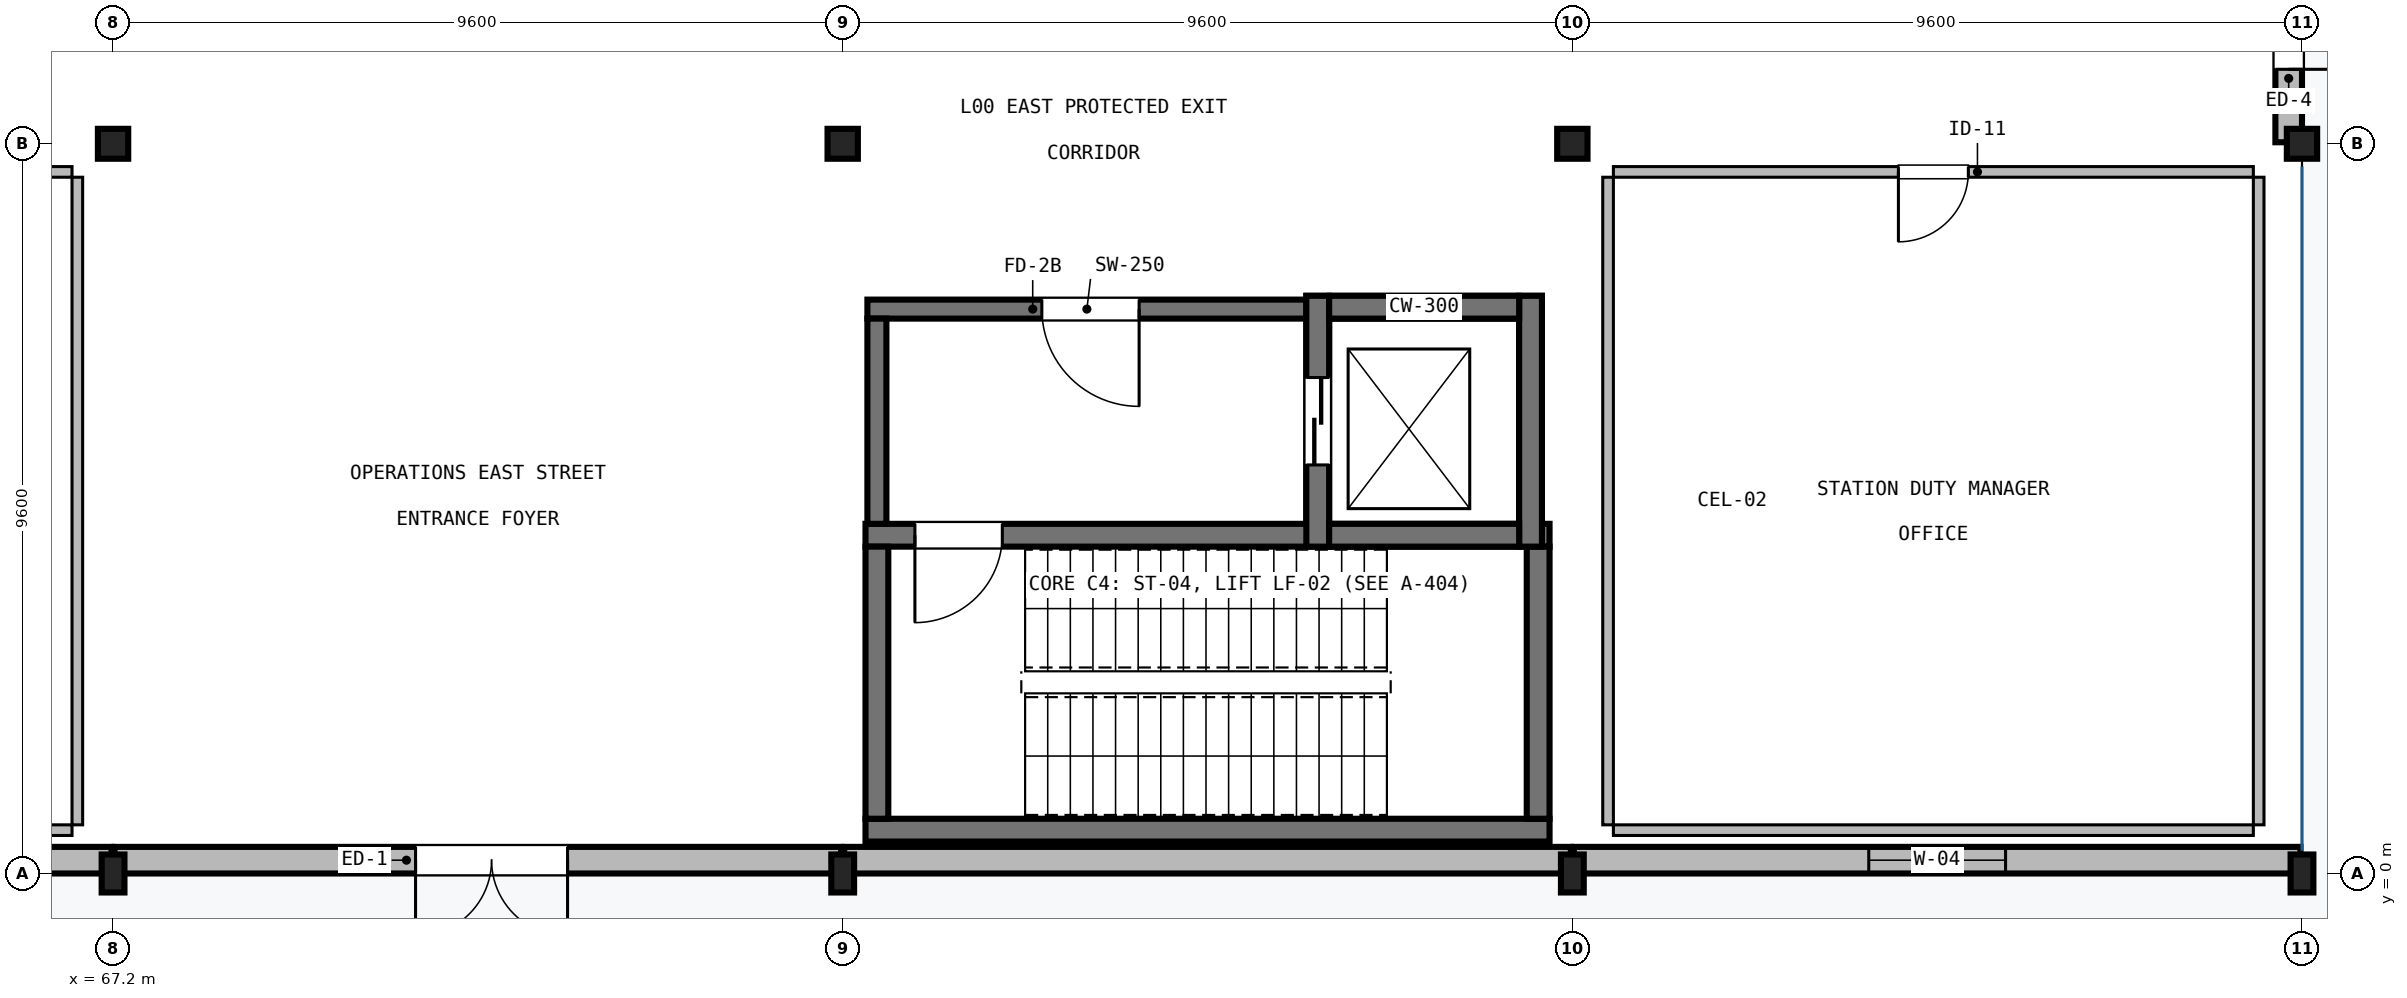
"""IFC4 building model, lengths in metres.
Left out: names, types, materials, properties, quantities, classifications, styles, units other than length and angle.
Written with IfcOpenShell. Run it as: python <this file> out.ifc"""

import sys

from ifc_helpers import new_model, si_unit, direction, frame, frame_2d, origin, origin_2d, place, context, subcontext, project, spatial, rectangle, i_section, extrude, element, fill, save


model = new_model("IFC4")
c1 = context("Model", 3, precision=1e-05, world=origin(), true_north=direction((0.0, 1.0)))
c2 = subcontext(c1, "Body", "Model", "MODEL_VIEW")
j1 = project(units=[si_unit("LENGTHUNIT", "METRE"), si_unit("PLANEANGLEUNIT", "RADIAN")], contexts=[c1])
p1 = place(None, origin())
s1 = spatial("IfcSite", under=j1, at=p1, CompositionType="ELEMENT")
p2 = place(p1, origin())
s2 = spatial("IfcBuilding", under=s1, at=p2, CompositionType="ELEMENT")
p3 = place(p2, origin())
s3 = spatial("IfcBuildingStorey", under=s2, at=p3, CompositionType="ELEMENT", Elevation=0.0)
p4 = place(p3, frame((67.2, 0.0, -0.36), z_axis=(0.0, 0.0, 1.0), x_axis=(1.0, 0.0, 0.0)))
e1 = element("IfcColumn", 1, at=p4, inside=s3, PredefinedType="COLUMN", context=c2, shape_type="SweptSolid", body=[
    extrude(i_section(OverallWidth=0.3, OverallDepth=0.5, WebThickness=0.014, FlangeThickness=0.028, FilletRadius=0.027, at=origin_2d()), origin(), (0.0, 0.0, 1.0), 6.11),
])
p5 = place(p3, frame((67.2, 9.6, -0.36), z_axis=(0.0, 0.0, 1.0), x_axis=(1.0, 0.0, 0.0)))
e2 = element("IfcColumn", 2, at=p5, inside=s3, PredefinedType="COLUMN", context=c2, shape_type="SweptSolid", body=[
    extrude(i_section(OverallWidth=0.399, OverallDepth=0.394, WebThickness=0.023, FlangeThickness=0.037, FilletRadius=0.015, at=origin_2d()), origin(), (0.0, 0.0, 1.0), 6.11),
])
p6 = place(p3, frame((76.8, 0.0, -0.36), z_axis=(0.0, 0.0, 1.0), x_axis=(1.0, 0.0, 0.0)))
e3 = element("IfcColumn", 3, at=p6, inside=s3, PredefinedType="COLUMN", context=c2, shape_type="SweptSolid", body=[
    extrude(i_section(OverallWidth=0.3, OverallDepth=0.5, WebThickness=0.014, FlangeThickness=0.028, FilletRadius=0.027, at=origin_2d()), origin(), (0.0, 0.0, 1.0), 6.11),
])
p7 = place(p3, frame((76.8, 9.6, -0.36), z_axis=(0.0, 0.0, 1.0), x_axis=(1.0, 0.0, 0.0)))
e4 = element("IfcColumn", 4, at=p7, inside=s3, PredefinedType="COLUMN", context=c2, shape_type="SweptSolid", body=[
    extrude(i_section(OverallWidth=0.399, OverallDepth=0.394, WebThickness=0.023, FlangeThickness=0.037, FilletRadius=0.015, at=origin_2d()), origin(), (0.0, 0.0, 1.0), 6.11),
])
p8 = place(p3, frame((86.4, 0.0, -0.36), z_axis=(0.0, 0.0, 1.0), x_axis=(1.0, 0.0, 0.0)))
e5 = element("IfcColumn", 5, at=p8, inside=s3, PredefinedType="COLUMN", context=c2, shape_type="SweptSolid", body=[
    extrude(i_section(OverallWidth=0.3, OverallDepth=0.5, WebThickness=0.014, FlangeThickness=0.028, FilletRadius=0.027, at=origin_2d()), origin(), (0.0, 0.0, 1.0), 6.11),
])
p9 = place(p3, frame((86.4, 9.6, -0.36), z_axis=(0.0, 0.0, 1.0), x_axis=(1.0, 0.0, 0.0)))
e6 = element("IfcColumn", 6, at=p9, inside=s3, PredefinedType="COLUMN", context=c2, shape_type="SweptSolid", body=[
    extrude(i_section(OverallWidth=0.399, OverallDepth=0.394, WebThickness=0.023, FlangeThickness=0.037, FilletRadius=0.015, at=origin_2d()), origin(), (0.0, 0.0, 1.0), 6.11),
])
p10 = place(p3, frame((96.0, 0.0, -0.36), z_axis=(0.0, 0.0, 1.0), x_axis=(1.0, 0.0, 0.0)))
e7 = element("IfcColumn", 7, at=p10, inside=s3, PredefinedType="COLUMN", context=c2, shape_type="SweptSolid", body=[
    extrude(i_section(OverallWidth=0.3, OverallDepth=0.5, WebThickness=0.014, FlangeThickness=0.028, FilletRadius=0.027, at=origin_2d()), origin(), (0.0, 0.0, 1.0), 6.11),
])
p11 = place(p3, frame((96.0, 9.6, -0.36), z_axis=(0.0, 0.0, 1.0), x_axis=(1.0, 0.0, 0.0)))
e8 = element("IfcColumn", 8, at=p11, inside=s3, PredefinedType="COLUMN", context=c2, shape_type="SweptSolid", body=[
    extrude(i_section(OverallWidth=0.399, OverallDepth=0.394, WebThickness=0.023, FlangeThickness=0.037, FilletRadius=0.015, at=origin_2d()), origin(), (0.0, 0.0, 1.0), 6.11),
])
p12 = place(p3, frame((77.1, 0.57, 0.0), z_axis=(0.0, 0.0, 1.0), x_axis=(1.0, 0.0, 0.0)))
e9 = element("IfcWall", 9, at=p12, inside=s3, PredefinedType="SHEAR", context=c2, shape_type="SweptSolid", body=[
    extrude(rectangle(XDim=9.0, YDim=0.3, at=frame_2d((4.5, 0.0))), origin(), (0.0, 0.0, 1.0), 5.75),
])
p13 = place(p3, frame((86.1, 4.45, 0.0), z_axis=(0.0, 0.0, 1.0), x_axis=(-1.0, 0.0, 0.0)))
e10 = element("IfcWall", 10, at=p13, inside=s3, PredefinedType="SHEAR", context=c2, shape_type="SweptSolid", body=[
    extrude(rectangle(XDim=9.0, YDim=0.3, at=frame_2d((4.5, 0.0))), origin(), (0.0, 0.0, 1.0), 5.75),
])
p14 = place(p13, frame((7.2, 0.0, 0.0)))
e11 = element("IfcOpeningElement", 11, at=p14, cuts=e10, PredefinedType="OPENING", context=c2, shape_type="SweptSolid", body=[
    extrude(rectangle(XDim=1.15, YDim=2.15, at=frame_2d((0.575, 1.075))), frame((0.0, 0.16, 0.0), z_axis=(0.0, -1.0, 0.0), x_axis=(1.0, 0.0, 0.0)), (0.0, 0.0, 1.0), 0.32),
])
for number, where, z_axis, x_axis in (
    (12, (77.25, 0.72, 0.0), (0.0, 0.0, 1.0), (0.0, 1.0, 0.0)),
    (13, (85.95, 4.3, 0.0), (0.0, 0.0, 1.0), (0.0, -1.0, 0.0)),
):
    element("IfcWall", number, at=place(p3, frame(where, z_axis=z_axis, x_axis=x_axis)), inside=s3, PredefinedType="SHEAR", context=c2, shape_type="SweptSolid", body=[
        extrude(rectangle(XDim=3.58, YDim=0.3, at=frame_2d((1.79, 0.0))), origin(), (0.0, 0.0, 1.0), 5.75),
    ])
p15 = place(p3, frame((83.05, 7.3, 0.0), z_axis=(0.0, 0.0, 1.0), x_axis=(0.0, -1.0, 0.0)))
e14 = element("IfcWall", 14, at=p15, inside=s3, PredefinedType="SHEAR", context=c2, shape_type="SweptSolid", body=[
    extrude(rectangle(XDim=2.7, YDim=0.3, at=frame_2d((1.35, 0.0))), origin(), (0.0, 0.0, 1.0), 5.75),
])
p16 = place(p15, frame((0.775, 0.0, 0.0)))
e15 = element("IfcOpeningElement", 15, at=p16, cuts=e14, PredefinedType="OPENING", context=c2, shape_type="SweptSolid", body=[
    extrude(rectangle(XDim=1.15, YDim=2.1, at=frame_2d((0.575, 1.05))), frame((0.0, 0.16, 0.0), z_axis=(0.0, -1.0, 0.0), x_axis=(1.0, 0.0, 0.0)), (0.0, 0.0, 1.0), 0.32),
])
p17 = place(p3, frame((85.85, 4.6, 0.0), z_axis=(0.0, 0.0, 1.0), x_axis=(0.0, 1.0, 0.0)))
e16 = element("IfcWall", 16, at=p17, inside=s3, PredefinedType="SHEAR", context=c2, shape_type="SweptSolid", body=[
    extrude(rectangle(XDim=2.7, YDim=0.3, at=frame_2d((1.35, 0.0))), origin(), (0.0, 0.0, 1.0), 5.75),
])
p18 = place(p3, frame((82.9, 7.45, 0.0), z_axis=(0.0, 0.0, 1.0), x_axis=(1.0, 0.0, 0.0)))
e17 = element("IfcWall", 17, at=p18, inside=s3, PredefinedType="SHEAR", context=c2, shape_type="SweptSolid", body=[
    extrude(rectangle(XDim=3.1, YDim=0.3, at=frame_2d((1.55, 0.0))), origin(), (0.0, 0.0, 1.0), 5.75),
])
p19 = place(p3, frame((82.9, 7.425, 0.0), z_axis=(0.0, 0.0, 1.0), x_axis=(-1.0, 0.0, 0.0)))
e18 = element("IfcWall", 18, at=p19, inside=s3, PredefinedType="SHEAR", context=c2, shape_type="SweptSolid", body=[
    extrude(rectangle(XDim=5.775, YDim=0.25, at=frame_2d((2.887, 0.0))), origin(), (0.0, 0.0, 1.0), 5.75),
])
p20 = place(p19, frame((2.2, 0.0, 0.0)))
e19 = element("IfcOpeningElement", 19, at=p20, cuts=e18, PredefinedType="OPENING", context=c2, shape_type="SweptSolid", body=[
    extrude(rectangle(XDim=1.28, YDim=2.2, at=frame_2d((0.64, 1.1))), frame((0.0, 0.135, 0.0), z_axis=(0.0, -1.0, 0.0), x_axis=(1.0, 0.0, 0.0)), (0.0, 0.0, 1.0), 0.27),
])
p21 = place(p3, frame((77.25, 4.6, 0.0), z_axis=(0.0, 0.0, 1.0), x_axis=(0.0, 1.0, 0.0)))
e20 = element("IfcWall", 20, at=p21, inside=s3, PredefinedType="SHEAR", context=c2, shape_type="SweptSolid", body=[
    extrude(rectangle(XDim=2.7, YDim=0.25, at=frame_2d((1.35, 0.0))), origin(), (0.0, 0.0, 1.0), 5.75),
])
for number, where, z_axis, x_axis in (
    (21, (83.05, 4.3, -1.2), (0.0, 0.0, 1.0), (0.0, 1.0, 0.0)),
    (22, (85.85, 4.3, -1.2), (0.0, 0.0, 1.0), (0.0, 1.0, 0.0)),
):
    element("IfcWall", number, at=place(p3, frame(where, z_axis=z_axis, x_axis=x_axis)), inside=s3, PredefinedType="SHEAR", context=c2, shape_type="SweptSolid", body=[
        extrude(rectangle(XDim=3.3, YDim=0.3, at=frame_2d((1.65, 0.0))), origin(), (0.0, 0.0, 1.0), 0.82),
    ])
for number, where, z_axis, x_axis in (
    (23, (83.2, 4.45, -1.2), (0.0, 0.0, 1.0), (1.0, 0.0, 0.0)),
    (24, (83.2, 7.45, -1.2), (0.0, 0.0, 1.0), (1.0, 0.0, 0.0)),
):
    element("IfcWall", number, at=place(p3, frame(where, z_axis=z_axis, x_axis=x_axis)), inside=s3, PredefinedType="SHEAR", context=c2, shape_type="SweptSolid", body=[
        extrude(rectangle(XDim=2.5, YDim=0.3, at=frame_2d((1.25, 0.0))), origin(), (0.0, 0.0, 1.0), 0.82),
    ])
p22 = place(p3, frame((67.18, 0.175, 0.0), z_axis=(0.0, 0.0, 1.0), x_axis=(-1.0, 0.0, 0.0)))
e25 = element("IfcWall", 25, at=p22, inside=s3, PredefinedType="SOLIDWALL", context=c2, shape_type="SweptSolid", body=[
    extrude(rectangle(XDim=9.56, YDim=0.35, at=frame_2d((4.78, 0.0))), origin(), (0.0, 0.0, 1.0), 5.4),
])
p23 = place(p22, frame((3.505, 0.0, 0.9)))
e26 = element("IfcOpeningElement", 26, at=p23, cuts=e25, PredefinedType="OPENING", context=c2, shape_type="SweptSolid", body=[
    extrude(rectangle(XDim=2.55, YDim=1.8, at=frame_2d((1.275, 0.9))), frame((0.0, 0.185, 0.0), z_axis=(0.0, -1.0, 0.0), x_axis=(1.0, 0.0, 0.0)), (0.0, 0.0, 1.0), 0.37),
])
p24 = place(p3, frame((76.78, 0.175, 0.0), z_axis=(0.0, 0.0, 1.0), x_axis=(-1.0, 0.0, 0.0)))
e27 = element("IfcWall", 27, at=p24, inside=s3, PredefinedType="SOLIDWALL", context=c2, shape_type="SweptSolid", body=[
    extrude(rectangle(XDim=9.56, YDim=0.35, at=frame_2d((4.78, 0.0))), origin(), (0.0, 0.0, 1.0), 5.4),
])
p25 = place(p24, frame((3.6, 0.0, 0.0)))
e28 = element("IfcOpeningElement", 28, at=p25, cuts=e27, PredefinedType="OPENING", context=c2, shape_type="SweptSolid", body=[
    extrude(rectangle(XDim=2.0, YDim=2.4, at=frame_2d((1.0, 1.2))), frame((0.0, 0.185, 0.0), z_axis=(0.0, -1.0, 0.0), x_axis=(1.0, 0.0, 0.0)), (0.0, 0.0, 1.0), 0.37),
])
p26 = place(p3, frame((86.38, 0.175, 0.0), z_axis=(0.0, 0.0, 1.0), x_axis=(-1.0, 0.0, 0.0)))
e29 = element("IfcWall", 29, at=p26, inside=s3, PredefinedType="SOLIDWALL", context=c2, shape_type="SweptSolid", body=[
    extrude(rectangle(XDim=9.56, YDim=0.35, at=frame_2d((4.78, 0.0))), origin(), (0.0, 0.0, 1.0), 5.4),
])
p27 = place(p3, frame((95.98, 0.175, 0.0), z_axis=(0.0, 0.0, 1.0), x_axis=(-1.0, 0.0, 0.0)))
e30 = element("IfcWall", 30, at=p27, inside=s3, PredefinedType="SOLIDWALL", context=c2, shape_type="SweptSolid", body=[
    extrude(rectangle(XDim=9.56, YDim=0.35, at=frame_2d((4.78, 0.0))), origin(), (0.0, 0.0, 1.0), 5.4),
])
p28 = place(p27, frame((3.88, 0.0, 0.9)))
e31 = element("IfcOpeningElement", 31, at=p28, cuts=e30, PredefinedType="OPENING", context=c2, shape_type="SweptSolid", body=[
    extrude(rectangle(XDim=1.8, YDim=1.8, at=frame_2d((0.9, 0.9))), frame((0.0, 0.185, 0.0), z_axis=(0.0, -1.0, 0.0), x_axis=(1.0, 0.0, 0.0)), (0.0, 0.0, 1.0), 0.37),
])
p29 = place(p3, frame((95.825, 19.18, 0.0), z_axis=(0.0, 0.0, 1.0), x_axis=(0.0, -1.0, 0.0)))
e32 = element("IfcWall", 32, at=p29, inside=s3, PredefinedType="SOLIDWALL", context=c2, shape_type="SweptSolid", body=[
    extrude(rectangle(XDim=9.56, YDim=0.35, at=frame_2d((4.78, 0.0))), origin(), (0.0, 0.0, 1.0), 5.217),
])
p30 = place(p29, frame((7.0, 0.0, 0.0)))
e33 = element("IfcOpeningElement", 33, at=p30, cuts=e32, PredefinedType="OPENING", context=c2, shape_type="SweptSolid", body=[
    extrude(rectangle(XDim=1.6, YDim=2.2, at=frame_2d((0.8, 1.1))), frame((0.0, 0.185, 0.0), z_axis=(0.0, -1.0, 0.0), x_axis=(1.0, 0.0, 0.0)), (0.0, 0.0, 1.0), 0.37),
])
p31 = place(p3, frame((66.66, 0.57, 0.0), z_axis=(0.0, 0.0, 1.0), x_axis=(-1.0, 0.0, 0.0)))
e34 = element("IfcWall", 34, at=p31, inside=s3, PredefinedType="PARTITIONING", context=c2, shape_type="SweptSolid", body=[
    extrude(rectangle(XDim=18.12, YDim=0.14, at=frame_2d((9.06, 0.0))), origin(), (0.0, 0.0, 1.0), 5.207),
])
p32 = place(p3, frame((48.54, 9.23, 0.0), z_axis=(0.0, 0.0, 1.0), x_axis=(1.0, 0.0, 0.0)))
e35 = element("IfcWall", 35, at=p32, inside=s3, PredefinedType="PARTITIONING", context=c2, shape_type="SweptSolid", body=[
    extrude(rectangle(XDim=18.12, YDim=0.14, at=frame_2d((9.06, 0.0))), origin(), (0.0, 0.0, 1.0), 5.207),
])
p33 = place(p32, frame((3.6, 0.0, 0.0)))
e36 = element("IfcOpeningElement", 36, at=p33, cuts=e35, PredefinedType="OPENING", context=c2, shape_type="SweptSolid", body=[
    extrude(rectangle(XDim=1.06, YDim=2.2, at=frame_2d((0.53, 1.1))), frame((0.0, 0.08, 0.0), z_axis=(0.0, -1.0, 0.0), x_axis=(1.0, 0.0, 0.0)), (0.0, 0.0, 1.0), 0.16),
])
p34 = place(p3, frame((66.73, 9.16, 0.0), z_axis=(0.0, 0.0, 1.0), x_axis=(0.0, -1.0, 0.0)))
e37 = element("IfcWall", 37, at=p34, inside=s3, PredefinedType="PARTITIONING", context=c2, shape_type="SweptSolid", body=[
    extrude(rectangle(XDim=8.52, YDim=0.14, at=frame_2d((4.26, 0.0))), origin(), (0.0, 0.0, 1.0), 5.39),
])
p35 = place(p3, frame((95.36, 0.57, 0.0), z_axis=(0.0, 0.0, 1.0), x_axis=(-1.0, 0.0, 0.0)))
e38 = element("IfcWall", 38, at=p35, inside=s3, PredefinedType="PARTITIONING", context=c2, shape_type="SweptSolid", body=[
    extrude(rectangle(XDim=8.42, YDim=0.14, at=frame_2d((4.21, 0.0))), origin(), (0.0, 0.0, 1.0), 5.39),
])
p36 = place(p3, frame((86.94, 9.23, 0.0), z_axis=(0.0, 0.0, 1.0), x_axis=(1.0, 0.0, 0.0)))
e39 = element("IfcWall", 39, at=p36, inside=s3, PredefinedType="PARTITIONING", context=c2, shape_type="SweptSolid", body=[
    extrude(rectangle(XDim=8.42, YDim=0.14, at=frame_2d((4.21, 0.0))), origin(), (0.0, 0.0, 1.0), 5.39),
])
p37 = place(p36, frame((3.75, 0.0, 0.0)))
e40 = element("IfcOpeningElement", 40, at=p37, cuts=e39, PredefinedType="OPENING", context=c2, shape_type="SweptSolid", body=[
    extrude(rectangle(XDim=0.92, YDim=2.15, at=frame_2d((0.46, 1.075))), frame((0.0, 0.08, 0.0), z_axis=(0.0, -1.0, 0.0), x_axis=(1.0, 0.0, 0.0)), (0.0, 0.0, 1.0), 0.16),
])
for number, where, z_axis, x_axis in (
    (41, (86.87, 0.64, 0.0), (0.0, 0.0, 1.0), (0.0, 1.0, 0.0)),
    (42, (95.43, 9.16, 0.0), (0.0, 0.0, 1.0), (0.0, -1.0, 0.0)),
):
    element("IfcWall", number, at=place(p3, frame(where, z_axis=z_axis, x_axis=x_axis)), inside=s3, PredefinedType="PARTITIONING", context=c2, shape_type="SweptSolid", body=[
        extrude(rectangle(XDim=8.52, YDim=0.14, at=frame_2d((4.26, 0.0))), origin(), (0.0, 0.0, 1.0), 5.39),
    ])
p38 = place(p14, origin())
e43 = element("IfcDoor", 43, at=p38, inside=s3, OperationType="SINGLE_SWING_RIGHT", PredefinedType="DOOR", context=c2, shape_type="SweptSolid", body=[
    extrude(rectangle(XDim=1.15, YDim=2.15, at=frame_2d((0.575, 1.075))), frame((0.0, 0.025, 0.0), z_axis=(0.0, -1.0, 0.0), x_axis=(1.0, 0.0, 0.0)), (0.0, 0.0, 1.0), 0.05),
])
fill(e11, e43)
p39 = place(p16, frame((1.15, 0.0, 0.0), z_axis=(0.0, 0.0, 1.0), x_axis=(-1.0, 0.0, 0.0)))
e44 = element("IfcDoor", 44, at=p39, inside=s3, OperationType="DOUBLE_DOOR_SLIDING", PredefinedType="DOOR", context=c2, shape_type="SweptSolid", body=[
    extrude(rectangle(XDim=1.15, YDim=2.1, at=frame_2d((0.575, 1.05))), frame((0.0, 0.025, 0.0), z_axis=(0.0, -1.0, 0.0), x_axis=(1.0, 0.0, 0.0)), (0.0, 0.0, 1.0), 0.05),
])
fill(e15, e44)
p40 = place(p20, origin())
e45 = element("IfcDoor", 45, at=p40, inside=s3, OperationType="SINGLE_SWING_LEFT", PredefinedType="DOOR", context=c2, shape_type="SweptSolid", body=[
    extrude(rectangle(XDim=1.28, YDim=2.2, at=frame_2d((0.64, 1.1))), frame((0.0, 0.025, 0.0), z_axis=(0.0, -1.0, 0.0), x_axis=(1.0, 0.0, 0.0)), (0.0, 0.0, 1.0), 0.05),
])
fill(e19, e45)
p41 = place(p25, origin())
e46 = element("IfcDoor", 46, at=p41, inside=s3, OperationType="DOUBLE_DOOR_SINGLE_SWING", PredefinedType="DOOR", context=c2, shape_type="SweptSolid", body=[
    extrude(rectangle(XDim=2.0, YDim=2.4, at=frame_2d((1.0, 1.2))), frame((0.0, 0.025, 0.0), z_axis=(0.0, -1.0, 0.0), x_axis=(1.0, 0.0, 0.0)), (0.0, 0.0, 1.0), 0.05),
])
fill(e28, e46)
p42 = place(p28, origin())
e47 = element("IfcWindow", 47, at=p42, inside=s3, PartitioningType="SINGLE_PANEL", PredefinedType="WINDOW", context=c2, shape_type="SweptSolid", body=[
    extrude(rectangle(XDim=1.8, YDim=1.8, at=frame_2d((0.9, 0.9))), frame((0.0, 0.03, 0.0), z_axis=(0.0, -1.0, 0.0), x_axis=(1.0, 0.0, 0.0)), (0.0, 0.0, 1.0), 0.06),
])
fill(e31, e47)
p43 = place(p30, origin())
e48 = element("IfcDoor", 48, at=p43, inside=s3, OperationType="DOUBLE_DOOR_SINGLE_SWING", PredefinedType="DOOR", context=c2, shape_type="SweptSolid", body=[
    extrude(rectangle(XDim=1.6, YDim=2.2, at=frame_2d((0.8, 1.1))), frame((0.0, 0.025, 0.0), z_axis=(0.0, -1.0, 0.0), x_axis=(1.0, 0.0, 0.0)), (0.0, 0.0, 1.0), 0.05),
])
fill(e33, e48)
p44 = place(p37, frame((0.92, 0.0, 0.0), z_axis=(0.0, 0.0, 1.0), x_axis=(-1.0, 0.0, 0.0)))
e49 = element("IfcDoor", 49, at=p44, inside=s3, OperationType="SINGLE_SWING_LEFT", PredefinedType="DOOR", context=c2, shape_type="SweptSolid", body=[
    extrude(rectangle(XDim=0.92, YDim=2.15, at=frame_2d((0.46, 1.075))), frame((0.0, 0.025, 0.0), z_axis=(0.0, -1.0, 0.0), x_axis=(1.0, 0.0, 0.0)), (0.0, 0.0, 1.0), 0.05),
])
fill(e40, e49)
save(model, sys.argv[1])
